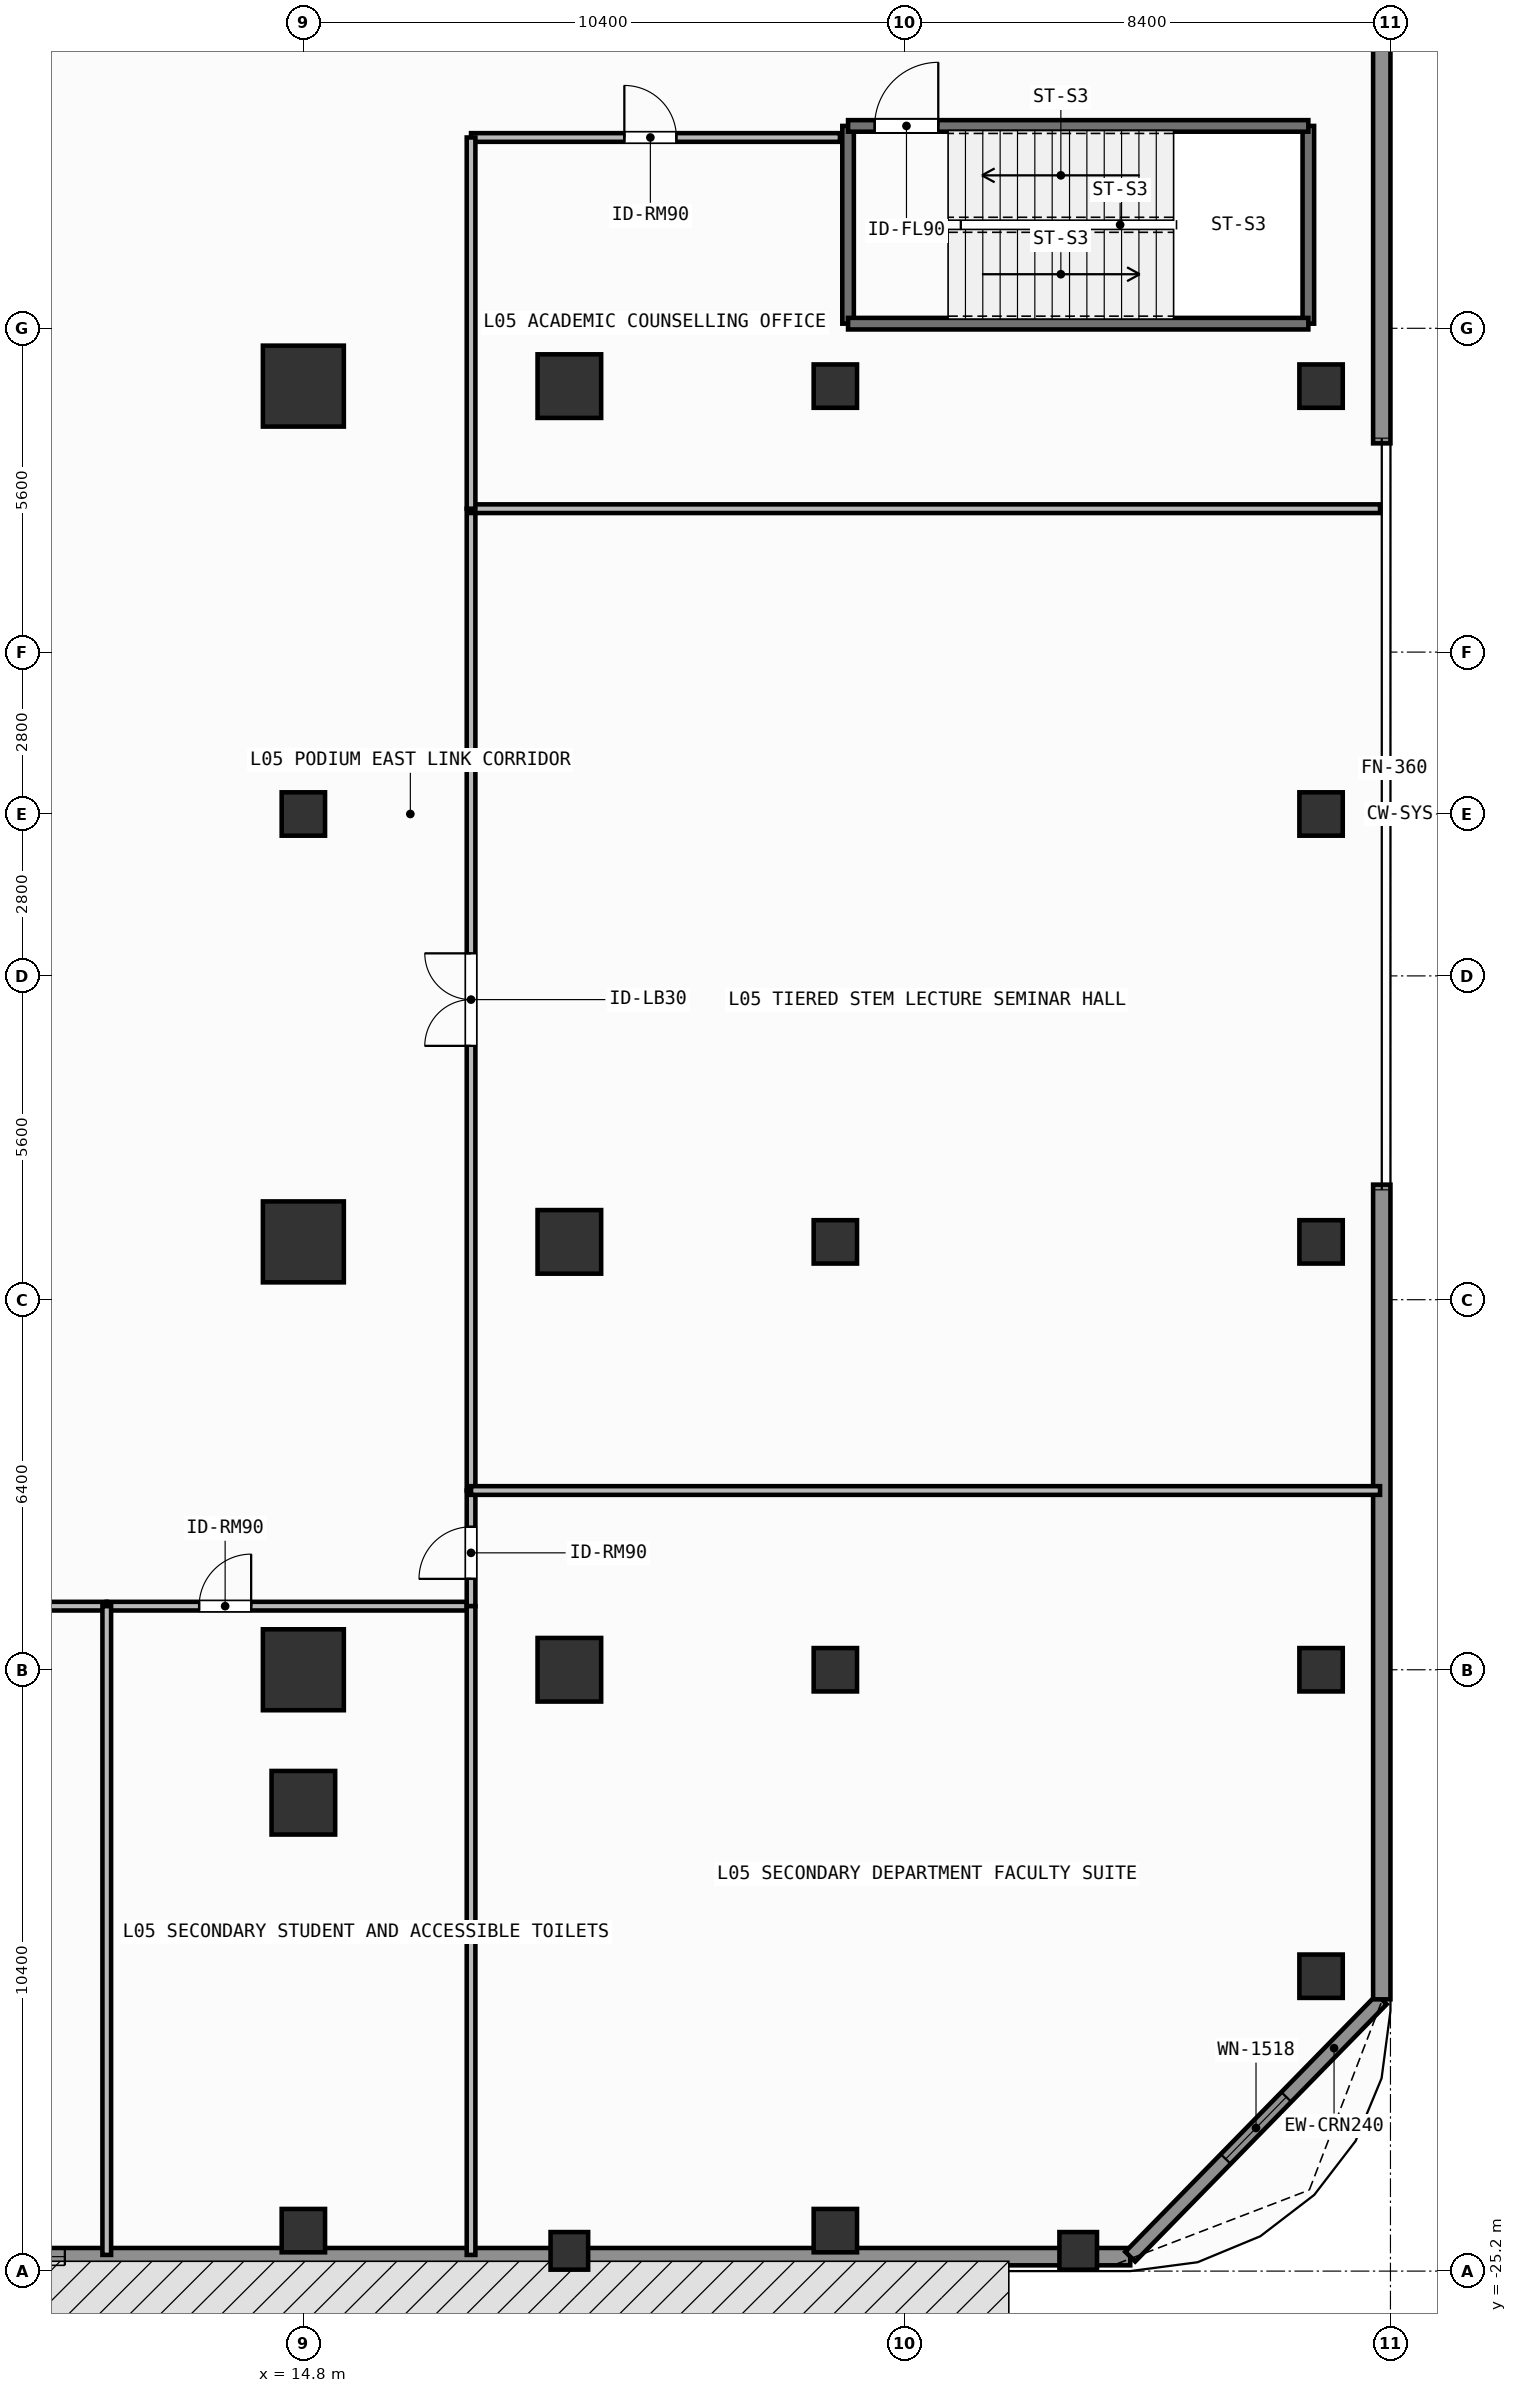
"""IFC4 building model, lengths in metres.
Left out: names, types, materials, properties, quantities, classifications, styles, units other than length and angle.
Written with IfcOpenShell. Run it as: python <this file> out.ifc"""

import sys

from ifc_helpers import new_model, si_unit, direction, frame, frame_2d, origin, origin_2d, place, context, subcontext, project, spatial, rectangle, extrude, element, fill, save


model = new_model("IFC4")
c1 = context("Model", 3, precision=1e-05, world=origin(), true_north=direction((0.0, 1.0)))
c2 = subcontext(c1, "Body", "Model", "MODEL_VIEW")
j1 = project(units=[si_unit("LENGTHUNIT", "METRE"), si_unit("PLANEANGLEUNIT", "RADIAN")], contexts=[c1])
p1 = place(None, origin())
s1 = spatial("IfcSite", under=j1, at=p1, CompositionType="ELEMENT")
p2 = place(p1, origin())
s2 = spatial("IfcBuilding", under=s1, at=p2, CompositionType="ELEMENT")
p3 = place(p2, frame((0.0, 0.0, 17.4)))
s3 = spatial("IfcBuildingStorey", under=s2, at=p3, CompositionType="ELEMENT", Elevation=17.4)
for number, where, z_axis, x_axis in (
    (1, (14.8, -14.8, 0.0), (0.0, 0.0, 1.0), (1.0, 0.0, 0.0)),
    (2, (14.8, -7.4, 0.0), (0.0, 0.0, 1.0), (1.0, 0.0, 0.0)),
    (3, (14.8, 7.4, 0.0), (0.0, 0.0, 1.0), (1.0, 0.0, 0.0)),
):
    element("IfcColumn", number, at=place(p3, frame(where, z_axis=z_axis, x_axis=x_axis)), inside=s3, PredefinedType="COLUMN", context=c2, shape_type="SweptSolid", body=[
        extrude(rectangle(XDim=1.4, YDim=1.4, at=origin_2d()), origin(), (0.0, 0.0, 1.0), 4.2),
    ])
for number, where, z_axis, x_axis in (
    (4, (19.4, -14.8, 0.0), (0.0, 0.0, 1.0), (1.0, 0.0, 0.0)),
    (5, (19.4, -7.4, 0.0), (0.0, 0.0, 1.0), (1.0, 0.0, 0.0)),
    (6, (19.4, 7.4, 0.0), (0.0, 0.0, 1.0), (1.0, 0.0, 0.0)),
    (7, (14.8, -17.1, 0.0), (0.0, 0.0, 1.0), (1.0, 0.0, 0.0)),
):
    element("IfcColumn", number, at=place(p3, frame(where, z_axis=z_axis, x_axis=x_axis)), inside=s3, PredefinedType="COLUMN", context=c2, shape_type="SweptSolid", body=[
        extrude(rectangle(XDim=1.1, YDim=1.1, at=origin_2d()), origin(), (0.0, 0.0, 1.0), 4.2),
    ])
for number, where, z_axis, x_axis in (
    (8, (14.8, -24.5, 0.0), (0.0, 0.0, 1.0), (1.0, 0.0, 0.0)),
    (9, (14.8, 0.0, 0.0), (0.0, 0.0, 1.0), (1.0, 0.0, 0.0)),
    (10, (24.0, -24.5, 0.0), (0.0, 0.0, 1.0), (1.0, 0.0, 0.0)),
    (11, (24.0, -14.8, 0.0), (0.0, 0.0, 1.0), (1.0, 0.0, 0.0)),
    (12, (24.0, -7.4, 0.0), (0.0, 0.0, 1.0), (1.0, 0.0, 0.0)),
    (13, (24.0, 7.4, 0.0), (0.0, 0.0, 1.0), (1.0, 0.0, 0.0)),
    (14, (32.4, -14.8, 0.0), (0.0, 0.0, 1.0), (1.0, 0.0, 0.0)),
    (15, (32.4, -7.4, 0.0), (0.0, 0.0, 1.0), (1.0, 0.0, 0.0)),
    (16, (32.4, 0.0, 0.0), (0.0, 0.0, 1.0), (1.0, 0.0, 0.0)),
    (17, (32.4, 7.4, 0.0), (0.0, 0.0, 1.0), (1.0, 0.0, 0.0)),
    (18, (32.4, -20.1, 0.0), (0.0, 0.0, 1.0), (1.0, 0.0, 0.0)),
):
    element("IfcColumn", number, at=place(p3, frame(where, z_axis=z_axis, x_axis=x_axis)), inside=s3, PredefinedType="COLUMN", context=c2, shape_type="SweptSolid", body=[
        extrude(rectangle(XDim=0.75, YDim=0.75, at=origin_2d()), origin(), (0.0, 0.0, 1.0), 4.2),
    ])
for number, where, z_axis, x_axis in (
    (19, (19.4, -24.85, 0.0), (0.0, 0.0, 1.0), (1.0, 0.0, 0.0)),
    (20, (28.2, -24.85, 0.0), (0.0, 0.0, 1.0), (1.0, 0.0, 0.0)),
):
    element("IfcColumn", number, at=place(p3, frame(where, z_axis=z_axis, x_axis=x_axis)), inside=s3, PredefinedType="PILASTER", context=c2, shape_type="SweptSolid", body=[
        extrude(rectangle(XDim=0.65, YDim=0.65, at=origin_2d()), origin(), (0.0, 0.0, 1.0), 4.2),
    ])
p4 = place(p3, frame((29.1, -24.95, 0.0), z_axis=(0.0, 0.0, 1.0), x_axis=(-1.0, 0.0, 0.0)))
e21 = element("IfcWall", 21, at=p4, inside=s3, PredefinedType="SOLIDWALL", context=c2, shape_type="SweptSolid", body=[
    extrude(rectangle(XDim=58.2, YDim=0.3, at=frame_2d((29.1, 0.0))), origin(), (0.0, 0.0, 1.0), 3.96),
])
p5 = place(p4, frame((39.825, 0.0, 0.85)))
e22 = element("IfcOpeningElement", 22, at=p5, cuts=e21, PredefinedType="OPENING", context=c2, shape_type="SweptSolid", body=[
    extrude(rectangle(XDim=2.1, YDim=2.2, at=frame_2d((1.05, 1.1))), frame((0.0, 0.16, 0.0), z_axis=(0.0, -1.0, 0.0), x_axis=(1.0, 0.0, 0.0)), (0.0, 0.0, 1.0), 0.32),
])
p6 = place(p4, frame((31.75, 0.0, 0.85)))
e23 = element("IfcOpeningElement", 23, at=p6, cuts=e21, PredefinedType="OPENING", context=c2, shape_type="SweptSolid", body=[
    extrude(rectangle(XDim=2.1, YDim=2.2, at=frame_2d((1.05, 1.1))), frame((0.0, 0.16, 0.0), z_axis=(0.0, -1.0, 0.0), x_axis=(1.0, 0.0, 0.0)), (0.0, 0.0, 1.0), 0.32),
])
p7 = place(p4, frame((24.35, 0.0, 0.85)))
e24 = element("IfcOpeningElement", 24, at=p7, cuts=e21, PredefinedType="OPENING", context=c2, shape_type="SweptSolid", body=[
    extrude(rectangle(XDim=2.1, YDim=2.2, at=frame_2d((1.05, 1.1))), frame((0.0, 0.16, 0.0), z_axis=(0.0, -1.0, 0.0), x_axis=(1.0, 0.0, 0.0)), (0.0, 0.0, 1.0), 0.32),
])
p8 = place(p4, frame((18.425, 0.0, 0.85)))
e25 = element("IfcOpeningElement", 25, at=p8, cuts=e21, PredefinedType="OPENING", context=c2, shape_type="SweptSolid", body=[
    extrude(rectangle(XDim=2.1, YDim=2.2, at=frame_2d((1.05, 1.1))), frame((0.0, 0.16, 0.0), z_axis=(0.0, -1.0, 0.0), x_axis=(1.0, 0.0, 0.0)), (0.0, 0.0, 1.0), 0.32),
])
p9 = place(p3, frame((33.45, -20.5, 0.0), z_axis=(0.0, 0.0, 1.0), x_axis=(-0.69901822973, -0.715103848756, 0.0)))
e26 = element("IfcWall", 26, at=p9, inside=s3, PredefinedType="SOLIDWALL", context=c2, shape_type="SweptSolid", body=[
    extrude(rectangle(XDim=6.223, YDim=0.24, at=frame_2d((3.111, 0.0))), origin(), (0.0, 0.0, 1.0), 3.96),
])
p10 = place(p9, frame((2.362, 0.0, 0.85)))
e27 = element("IfcOpeningElement", 27, at=p10, cuts=e26, PredefinedType="OPENING", context=c2, shape_type="SweptSolid", body=[
    extrude(rectangle(XDim=1.5, YDim=1.85, at=frame_2d((0.75, 0.925))), frame((0.0, 0.13, 0.0), z_axis=(0.0, -1.0, 0.0), x_axis=(1.0, 0.0, 0.0)), (0.0, 0.0, 1.0), 0.26),
])
for number, where, z_axis, x_axis in (
    (28, (33.45, -20.5, 0.0), (0.0, 0.0, 1.0), (0.0, 1.0, 0.0)),
    (29, (33.45, 6.41, 0.0), (0.0, 0.0, 1.0), (0.0, 1.0, 0.0)),
):
    element("IfcWall", number, at=place(p3, frame(where, z_axis=z_axis, x_axis=x_axis)), inside=s3, PredefinedType="SOLIDWALL", context=c2, shape_type="SweptSolid", body=[
        extrude(rectangle(XDim=14.09, YDim=0.3, at=frame_2d((7.045, 0.0))), origin(), (0.0, 0.0, 1.0), 3.96),
    ])
for number, where, z_axis, x_axis in (
    (30, (24.22, 8.48, 0.0), (0.0, 0.0, 1.0), (0.0, 1.0, 0.0)),
    (31, (32.18, 11.9, 0.0), (0.0, 0.0, 1.0), (0.0, -1.0, 0.0)),
):
    element("IfcWall", number, at=place(p3, frame(where, z_axis=z_axis, x_axis=x_axis)), inside=s3, PredefinedType="SHEAR", context=c2, shape_type="SweptSolid", body=[
        extrude(rectangle(XDim=3.42, YDim=0.2, at=frame_2d((1.71, 0.0))), origin(), (0.0, 0.0, 1.0), 3.96),
    ])
p11 = place(p3, frame((32.18, 8.48, 0.0), z_axis=(0.0, 0.0, 1.0), x_axis=(-1.0, 0.0, 0.0)))
e32 = element("IfcWall", 32, at=p11, inside=s3, PredefinedType="SHEAR", context=c2, shape_type="SweptSolid", body=[
    extrude(rectangle(XDim=7.96, YDim=0.2, at=frame_2d((3.98, 0.0))), origin(), (0.0, 0.0, 1.0), 3.96),
])
p12 = place(p3, frame((24.22, 11.9, 0.0), z_axis=(0.0, 0.0, 1.0), x_axis=(1.0, 0.0, 0.0)))
e33 = element("IfcWall", 33, at=p12, inside=s3, PredefinedType="SHEAR", context=c2, shape_type="SweptSolid", body=[
    extrude(rectangle(XDim=7.96, YDim=0.2, at=frame_2d((3.98, 0.0))), origin(), (0.0, 0.0, 1.0), 3.96),
])
p13 = place(p12, frame((0.46, 0.0, 0.0)))
e34 = element("IfcOpeningElement", 34, at=p13, cuts=e33, PredefinedType="OPENING", context=c2, shape_type="SweptSolid", body=[
    extrude(rectangle(XDim=1.1, YDim=2.15, at=frame_2d((0.55, 1.075))), frame((0.0, 0.11, 0.0), z_axis=(0.0, -1.0, 0.0), x_axis=(1.0, 0.0, 0.0)), (0.0, 0.0, 1.0), 0.22),
])
p14 = place(p3, frame((17.7, 11.7, 0.0), z_axis=(0.0, 0.0, 1.0), x_axis=(1.0, 0.0, 0.0)))
e35 = element("IfcWall", 35, at=p14, inside=s3, PredefinedType="PARTITIONING", context=c2, shape_type="SweptSolid", body=[
    extrude(rectangle(XDim=6.38, YDim=0.15, at=frame_2d((3.19, 0.0))), origin(), (0.0, 0.0, 1.0), 3.96),
])
p15 = place(p14, frame((2.651, 0.0, 0.0)))
e36 = element("IfcOpeningElement", 36, at=p15, cuts=e35, PredefinedType="OPENING", context=c2, shape_type="SweptSolid", body=[
    extrude(rectangle(XDim=0.9, YDim=2.1, at=frame_2d((0.45, 1.05))), frame((0.0, 0.085, 0.0), z_axis=(0.0, -1.0, 0.0), x_axis=(1.0, 0.0, 0.0)), (0.0, 0.0, 1.0), 0.17),
])
p16 = place(p3, frame((17.7, -11.7, 0.0), z_axis=(0.0, 0.0, 1.0), x_axis=(0.0, 1.0, 0.0)))
e37 = element("IfcWall", 37, at=p16, inside=s3, PredefinedType="PARTITIONING", context=c2, shape_type="SweptSolid", body=[
    extrude(rectangle(XDim=16.98, YDim=0.15, at=frame_2d((8.49, 0.0))), origin(), (0.0, 0.0, 1.0), 3.96),
])
p17 = place(p16, frame((7.69, 0.0, 0.0)))
e38 = element("IfcOpeningElement", 38, at=p17, cuts=e37, PredefinedType="OPENING", context=c2, shape_type="SweptSolid", body=[
    extrude(rectangle(XDim=1.6, YDim=2.3, at=frame_2d((0.8, 1.15))), frame((0.0, 0.085, 0.0), z_axis=(0.0, -1.0, 0.0), x_axis=(1.0, 0.0, 0.0)), (0.0, 0.0, 1.0), 0.17),
])
p18 = place(p3, frame((-9.2, -13.7, 0.0), z_axis=(0.0, 0.0, 1.0), x_axis=(1.0, 0.0, 0.0)))
e39 = element("IfcWall", 39, at=p18, inside=s3, PredefinedType="PARTITIONING", context=c2, shape_type="SweptSolid", body=[
    extrude(rectangle(XDim=20.6, YDim=0.15, at=frame_2d((10.3, 0.0))), origin(), (0.0, 0.0, 1.0), 3.96),
])
p19 = place(p18, frame((10.029, 0.0, 0.0)))
e40 = element("IfcOpeningElement", 40, at=p19, cuts=e39, PredefinedType="OPENING", context=c2, shape_type="SweptSolid", body=[
    extrude(rectangle(XDim=0.9, YDim=2.1, at=frame_2d((0.45, 1.05))), frame((0.0, 0.085, 0.0), z_axis=(0.0, -1.0, 0.0), x_axis=(1.0, 0.0, 0.0)), (0.0, 0.0, 1.0), 0.17),
])
p20 = place(p3, frame((11.4, -13.7, 0.0), z_axis=(0.0, 0.0, 1.0), x_axis=(1.0, 0.0, 0.0)))
e41 = element("IfcWall", 41, at=p20, inside=s3, PredefinedType="PARTITIONING", context=c2, shape_type="SweptSolid", body=[
    extrude(rectangle(XDim=6.25, YDim=0.15, at=frame_2d((3.125, 0.0))), origin(), (0.0, 0.0, 1.0), 3.96),
])
p21 = place(p20, frame((1.597, 0.0, 0.0)))
e42 = element("IfcOpeningElement", 42, at=p21, cuts=e41, PredefinedType="OPENING", context=c2, shape_type="SweptSolid", body=[
    extrude(rectangle(XDim=0.9, YDim=2.1, at=frame_2d((0.45, 1.05))), frame((0.0, 0.085, 0.0), z_axis=(0.0, -1.0, 0.0), x_axis=(1.0, 0.0, 0.0)), (0.0, 0.0, 1.0), 0.17),
])
p22 = place(p3, frame((17.7, -13.7, 0.0), z_axis=(0.0, 0.0, 1.0), x_axis=(0.0, 1.0, 0.0)))
e43 = element("IfcWall", 43, at=p22, inside=s3, PredefinedType="PARTITIONING", context=c2, shape_type="SweptSolid", body=[
    extrude(rectangle(XDim=2.0, YDim=0.15, at=frame_2d((1.0, 0.0))), origin(), (0.0, 0.0, 1.0), 3.96),
])
p23 = place(p22, frame((0.472, 0.0, 0.0)))
e44 = element("IfcOpeningElement", 44, at=p23, cuts=e43, PredefinedType="OPENING", context=c2, shape_type="SweptSolid", body=[
    extrude(rectangle(XDim=0.9, YDim=2.1, at=frame_2d((0.45, 1.05))), frame((0.0, 0.085, 0.0), z_axis=(0.0, -1.0, 0.0), x_axis=(1.0, 0.0, 0.0)), (0.0, 0.0, 1.0), 0.17),
])
for number, where, z_axis, x_axis in (
    (45, (17.7, -11.7, 0.0), (0.0, 0.0, 1.0), (1.0, 0.0, 0.0)),
    (46, (17.7, 5.28, 0.0), (0.0, 0.0, 1.0), (1.0, 0.0, 0.0)),
):
    element("IfcWall", number, at=place(p3, frame(where, z_axis=z_axis, x_axis=x_axis)), inside=s3, PredefinedType="PARTITIONING", context=c2, shape_type="SweptSolid", body=[
        extrude(rectangle(XDim=15.72, YDim=0.15, at=frame_2d((7.86, 0.0))), origin(), (0.0, 0.0, 1.0), 3.96),
    ])
p24 = place(p3, frame((17.7, 5.28, 0.0), z_axis=(0.0, 0.0, 1.0), x_axis=(0.0, 1.0, 0.0)))
e47 = element("IfcWall", 47, at=p24, inside=s3, PredefinedType="PARTITIONING", context=c2, shape_type="SweptSolid", body=[
    extrude(rectangle(XDim=6.42, YDim=0.15, at=frame_2d((3.21, 0.0))), origin(), (0.0, 0.0, 1.0), 3.96),
])
for number, where, z_axis, x_axis in (
    (48, (11.4, -24.92, 0.0), (0.0, 0.0, 1.0), (0.0, 1.0, 0.0)),
    (49, (17.7, -24.92, 0.0), (0.0, 0.0, 1.0), (0.0, 1.0, 0.0)),
):
    element("IfcWall", number, at=place(p3, frame(where, z_axis=z_axis, x_axis=x_axis)), inside=s3, PredefinedType="PARTITIONING", context=c2, shape_type="SweptSolid", body=[
        extrude(rectangle(XDim=11.22, YDim=0.15, at=frame_2d((5.61, 0.0))), origin(), (0.0, 0.0, 1.0), 3.96),
    ])
p25 = place(p10, origin())
e50 = element("IfcWindow", 50, at=p25, inside=s3, PartitioningType="SINGLE_PANEL", PredefinedType="WINDOW", context=c2, shape_type="SweptSolid", body=[
    extrude(rectangle(XDim=1.5, YDim=1.85, at=frame_2d((0.75, 0.925))), frame((0.0, 0.03, 0.0), z_axis=(0.0, -1.0, 0.0), x_axis=(1.0, 0.0, 0.0)), (0.0, 0.0, 1.0), 0.06),
])
fill(e27, e50)
p26 = place(p8, origin())
e51 = element("IfcWindow", 51, at=p26, inside=s3, PartitioningType="SINGLE_PANEL", PredefinedType="WINDOW", context=c2, shape_type="SweptSolid", body=[
    extrude(rectangle(XDim=2.1, YDim=2.2, at=frame_2d((1.05, 1.1))), frame((0.0, 0.03, 0.0), z_axis=(0.0, -1.0, 0.0), x_axis=(1.0, 0.0, 0.0)), (0.0, 0.0, 1.0), 0.06),
])
fill(e25, e51)
p27 = place(p13, origin())
e52 = element("IfcDoor", 52, at=p27, inside=s3, OperationType="SINGLE_SWING_RIGHT", PredefinedType="DOOR", context=c2, shape_type="SweptSolid", body=[
    extrude(rectangle(XDim=1.1, YDim=2.15, at=frame_2d((0.55, 1.075))), frame((0.0, 0.025, 0.0), z_axis=(0.0, -1.0, 0.0), x_axis=(1.0, 0.0, 0.0)), (0.0, 0.0, 1.0), 0.05),
])
fill(e34, e52)
p28 = place(p15, origin())
e53 = element("IfcDoor", 53, at=p28, inside=s3, OperationType="SINGLE_SWING_LEFT", PredefinedType="DOOR", context=c2, shape_type="SweptSolid", body=[
    extrude(rectangle(XDim=0.9, YDim=2.1, at=frame_2d((0.45, 1.05))), frame((0.0, 0.025, 0.0), z_axis=(0.0, -1.0, 0.0), x_axis=(1.0, 0.0, 0.0)), (0.0, 0.0, 1.0), 0.05),
])
fill(e36, e53)
p29 = place(p17, origin())
e54 = element("IfcDoor", 54, at=p29, inside=s3, OperationType="SINGLE_SWING_LEFT", PredefinedType="DOOR", context=c2, shape_type="SweptSolid", body=[
    extrude(rectangle(XDim=1.6, YDim=2.3, at=frame_2d((0.8, 1.15))), frame((0.0, 0.025, 0.0), z_axis=(0.0, -1.0, 0.0), x_axis=(1.0, 0.0, 0.0)), (0.0, 0.0, 1.0), 0.05),
])
fill(e38, e54)
p30 = place(p21, origin())
e55 = element("IfcDoor", 55, at=p30, inside=s3, OperationType="SINGLE_SWING_RIGHT", PredefinedType="DOOR", context=c2, shape_type="SweptSolid", body=[
    extrude(rectangle(XDim=0.9, YDim=2.1, at=frame_2d((0.45, 1.05))), frame((0.0, 0.025, 0.0), z_axis=(0.0, -1.0, 0.0), x_axis=(1.0, 0.0, 0.0)), (0.0, 0.0, 1.0), 0.05),
])
fill(e42, e55)
p31 = place(p23, origin())
e56 = element("IfcDoor", 56, at=p31, inside=s3, OperationType="SINGLE_SWING_LEFT", PredefinedType="DOOR", context=c2, shape_type="SweptSolid", body=[
    extrude(rectangle(XDim=0.9, YDim=2.1, at=frame_2d((0.45, 1.05))), frame((0.0, 0.025, 0.0), z_axis=(0.0, -1.0, 0.0), x_axis=(1.0, 0.0, 0.0)), (0.0, 0.0, 1.0), 0.05),
])
fill(e44, e56)
save(model, sys.argv[1])
